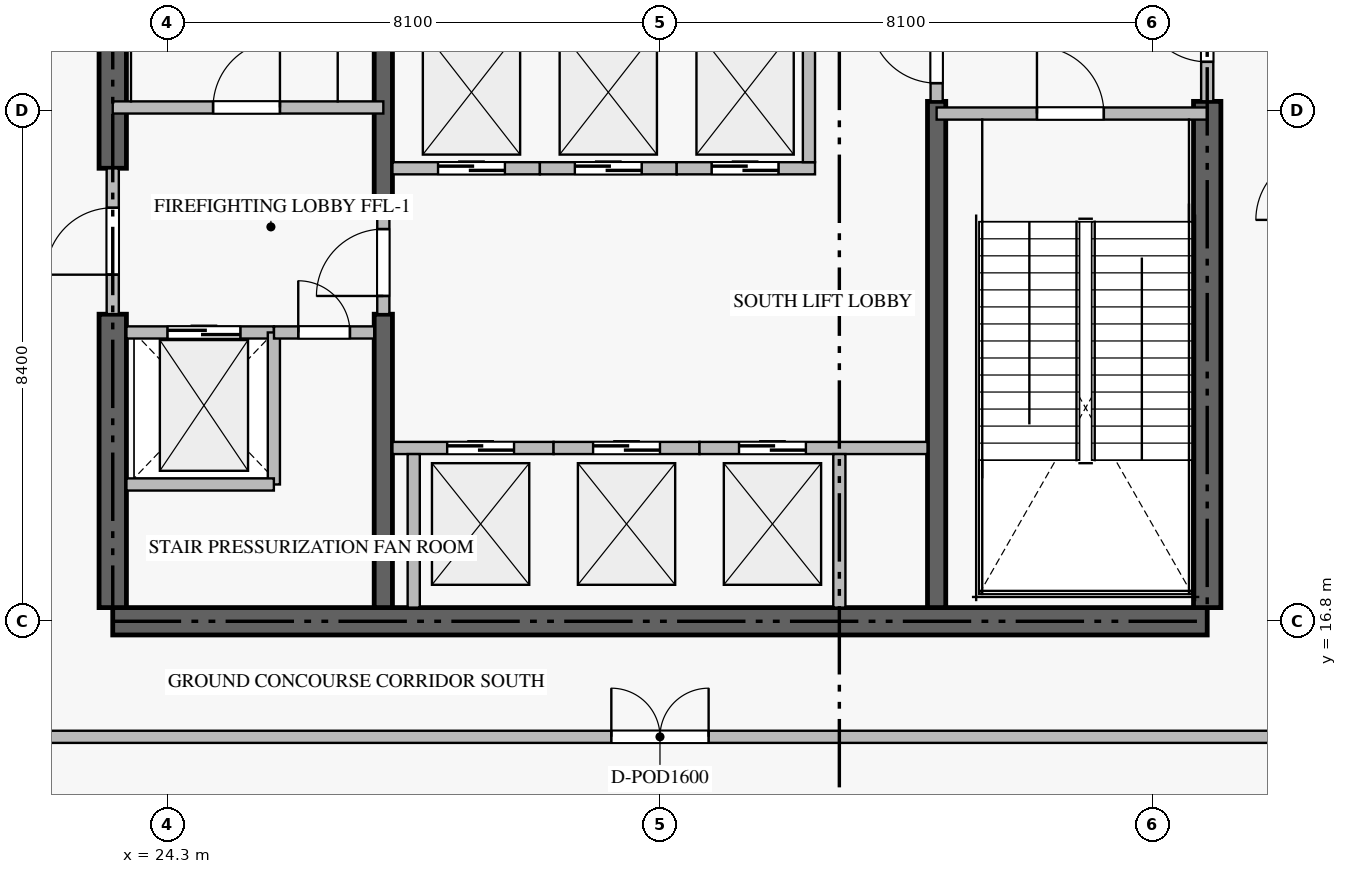
"""IFC4 building model, lengths in metres.
Left out: names, types, materials, properties, quantities, classifications, styles, units other than length and angle.
Written with IfcOpenShell. Run it as: python <this file> out.ifc"""

import sys

from ifc_helpers import new_model, si_unit, direction, frame, frame_2d, origin, place, context, subcontext, project, spatial, rectangle, extrude, source, transform, mapped, element, fill, save


model = new_model("IFC4")
c1 = context("Model", 3, precision=1e-05, world=origin(), true_north=direction((0.0, 1.0)))
c2 = subcontext(c1, "Body", "Model", "MODEL_VIEW")
j1 = project(units=[si_unit("LENGTHUNIT", "METRE"), si_unit("PLANEANGLEUNIT", "RADIAN")], contexts=[c1])
p1 = place(None, origin())
s1 = spatial("IfcSite", under=j1, at=p1, CompositionType="ELEMENT")
p2 = place(p1, origin())
s2 = spatial("IfcBuilding", under=s1, at=p2, CompositionType="ELEMENT")
p3 = place(p2, origin())
s3 = spatial("IfcBuildingStorey", under=s2, at=p3, CompositionType="ELEMENT", Elevation=0.0)
p4 = place(p3, frame((23.4, 16.8, -0.38), z_axis=(0.0, 0.0, 1.0), x_axis=(1.0, 0.0, 0.0)))
e1 = element("IfcWall", 1, at=p4, inside=s3, PredefinedType="SHEAR", context=c2, shape_type="SweptSolid", body=[
    extrude(rectangle(XDim=18.0, YDim=0.45, at=frame_2d((9.0, 0.0))), origin(), (0.0, 0.0, 1.0), 5.498),
])
p5 = place(p3, frame((23.4, 17.025, -0.38), z_axis=(0.0, 0.0, 1.0), x_axis=(0.0, 1.0, 0.0)))
e2 = element("IfcWall", 2, at=p5, inside=s3, PredefinedType="SHEAR", context=c2, shape_type="SweptSolid", body=[
    extrude(rectangle(XDim=4.825, YDim=0.45, at=frame_2d((2.413, 0.0))), origin(), (0.0, 0.0, 1.0), 5.498),
])
p6 = place(p3, frame((23.4, 24.25, -0.38), z_axis=(0.0, 0.0, 1.0), x_axis=(0.0, 1.0, 0.0)))
e3 = element("IfcWall", 3, at=p6, inside=s3, PredefinedType="SHEAR", context=c2, shape_type="SweptSolid", body=[
    extrude(rectangle(XDim=9.125, YDim=0.45, at=frame_2d((4.562, 0.0))), origin(), (0.0, 0.0, 1.0), 5.498),
])
p7 = place(p3, frame((41.4, 17.025, -0.38), z_axis=(0.0, 0.0, 1.0), x_axis=(0.0, 1.0, 0.0)))
e4 = element("IfcWall", 4, at=p7, inside=s3, PredefinedType="SHEAR", context=c2, shape_type="SweptSolid", body=[
    extrude(rectangle(XDim=8.325, YDim=0.45, at=frame_2d((4.163, 0.0))), origin(), (0.0, 0.0, 1.0), 5.498),
])
p8 = place(p3, frame((27.85, 17.025, -0.38), z_axis=(0.0, 0.0, 1.0), x_axis=(0.0, 1.0, 0.0)))
e5 = element("IfcWall", 5, at=p8, inside=s3, PredefinedType="SHEAR", context=c2, shape_type="SweptSolid", body=[
    extrude(rectangle(XDim=4.825, YDim=0.3, at=frame_2d((2.413, 0.0))), origin(), (0.0, 0.0, 1.0), 5.498),
])
p9 = place(p3, frame((27.85, 23.55, -0.38), z_axis=(0.0, 0.0, 1.0), x_axis=(0.0, 1.0, 0.0)))
e6 = element("IfcWall", 6, at=p9, inside=s3, PredefinedType="SHEAR", context=c2, shape_type="SweptSolid", body=[
    extrude(rectangle(XDim=9.825, YDim=0.3, at=frame_2d((4.913, 0.0))), origin(), (0.0, 0.0, 1.0), 5.498),
])
p10 = place(p3, frame((36.95, 17.025, -0.38), z_axis=(0.0, 0.0, 1.0), x_axis=(0.0, 1.0, 0.0)))
e7 = element("IfcWall", 7, at=p10, inside=s3, PredefinedType="SHEAR", context=c2, shape_type="SweptSolid", body=[
    extrude(rectangle(XDim=8.325, YDim=0.3, at=frame_2d((4.163, 0.0))), origin(), (0.0, 0.0, 1.0), 5.498),
])
p11 = place(p3, frame((23.4, 25.25, 0.0), z_axis=(0.0, 0.0, 1.0), x_axis=(1.0, 0.0, 0.0)))
e8 = element("IfcWall", 8, at=p11, inside=s3, PredefinedType="STANDARD", context=c2, shape_type="SweptSolid", body=[
    extrude(rectangle(XDim=4.45, YDim=0.2, at=frame_2d((2.225, 0.0))), origin(), (0.0, 0.0, 1.0), 5.12),
])
p12 = place(p11, frame((1.65, 0.0, 0.0)))
e9 = element("IfcOpeningElement", 9, at=p12, cuts=e8, PredefinedType="OPENING", context=c2, shape_type="SweptSolid", body=[
    extrude(rectangle(XDim=1.1, YDim=2.15, at=frame_2d((0.55, 1.075))), frame((0.0, 0.11, 0.0), z_axis=(0.0, -1.0, 0.0), x_axis=(1.0, 0.0, 0.0)), (0.0, 0.0, 1.0), 0.22),
])
p13 = place(p3, frame((36.95, 25.15, 0.0), z_axis=(0.0, 0.0, 1.0), x_axis=(1.0, 0.0, 0.0)))
e10 = element("IfcWall", 10, at=p13, inside=s3, PredefinedType="STANDARD", context=c2, shape_type="SweptSolid", body=[
    extrude(rectangle(XDim=4.45, YDim=0.2, at=frame_2d((2.225, 0.0))), origin(), (0.0, 0.0, 1.0), 5.12),
])
p14 = place(p13, frame((1.65, 0.0, 0.0)))
e11 = element("IfcOpeningElement", 11, at=p14, cuts=e10, PredefinedType="OPENING", context=c2, shape_type="SweptSolid", body=[
    extrude(rectangle(XDim=1.1, YDim=2.15, at=frame_2d((0.55, 1.075))), frame((0.0, 0.11, 0.0), z_axis=(0.0, -1.0, 0.0), x_axis=(1.0, 0.0, 0.0)), (0.0, 0.0, 1.0), 0.22),
])
p15 = place(p3, frame((23.625, 21.55, 0.0), z_axis=(0.0, 0.0, 1.0), x_axis=(1.0, 0.0, 0.0)))
e12 = element("IfcWall", 12, at=p15, inside=s3, PredefinedType="STANDARD", context=c2, shape_type="SweptSolid", body=[
    extrude(rectangle(XDim=2.425, YDim=0.2, at=frame_2d((1.212, 0.0))), origin(), (0.0, 0.0, 1.0), 5.12),
])
p16 = place(p15, frame((0.675, 0.0, 0.0)))
e13 = element("IfcOpeningElement", 13, at=p16, cuts=e12, PredefinedType="OPENING", context=c2, shape_type="SweptSolid", body=[
    extrude(rectangle(XDim=1.2, YDim=2.2, at=frame_2d((0.6, 1.1))), frame((0.0, 0.11, 0.0), z_axis=(0.0, -1.0, 0.0), x_axis=(1.0, 0.0, 0.0)), (0.0, 0.0, 1.0), 0.22),
])
p17 = place(p3, frame((28.0, 19.65, 0.0), z_axis=(0.0, 0.0, 1.0), x_axis=(1.0, 0.0, 0.0)))
e14 = element("IfcWall", 14, at=p17, inside=s3, PredefinedType="STANDARD", context=c2, shape_type="SweptSolid", body=[
    extrude(rectangle(XDim=2.65, YDim=0.2, at=frame_2d((1.325, 0.0))), origin(), (0.0, 0.0, 1.0), 5.12),
])
p18 = place(p17, frame((0.9, 0.0, 0.0)))
e15 = element("IfcOpeningElement", 15, at=p18, cuts=e14, PredefinedType="OPENING", context=c2, shape_type="SweptSolid", body=[
    extrude(rectangle(XDim=1.1, YDim=2.2, at=frame_2d((0.55, 1.1))), frame((0.0, 0.11, 0.0), z_axis=(0.0, -1.0, 0.0), x_axis=(1.0, 0.0, 0.0)), (0.0, 0.0, 1.0), 0.22),
])
p19 = place(p3, frame((28.35, 17.025, 0.0), z_axis=(0.0, 0.0, 1.0), x_axis=(0.0, 1.0, 0.0)))
e16 = element("IfcWall", 16, at=p19, inside=s3, PredefinedType="STANDARD", context=c2, shape_type="SweptSolid", body=[
    extrude(rectangle(XDim=2.525, YDim=0.2, at=frame_2d((1.263, 0.0))), origin(), (0.0, 0.0, 1.0), 5.12),
])
p20 = place(p3, frame((30.65, 19.65, 0.0), z_axis=(0.0, 0.0, 1.0), x_axis=(1.0, 0.0, 0.0)))
e17 = element("IfcWall", 17, at=p20, inside=s3, PredefinedType="STANDARD", context=c2, shape_type="SweptSolid", body=[
    extrude(rectangle(XDim=2.4, YDim=0.2, at=frame_2d((1.2, 0.0))), origin(), (0.0, 0.0, 1.0), 5.12),
])
p21 = place(p20, frame((0.65, 0.0, 0.0)))
e18 = element("IfcOpeningElement", 18, at=p21, cuts=e17, PredefinedType="OPENING", context=c2, shape_type="SweptSolid", body=[
    extrude(rectangle(XDim=1.1, YDim=2.2, at=frame_2d((0.55, 1.1))), frame((0.0, 0.11, 0.0), z_axis=(0.0, -1.0, 0.0), x_axis=(1.0, 0.0, 0.0)), (0.0, 0.0, 1.0), 0.22),
])
p22 = place(p3, frame((33.05, 19.65, 0.0), z_axis=(0.0, 0.0, 1.0), x_axis=(1.0, 0.0, 0.0)))
e19 = element("IfcWall", 19, at=p22, inside=s3, PredefinedType="STANDARD", context=c2, shape_type="SweptSolid", body=[
    extrude(rectangle(XDim=3.75, YDim=0.2, at=frame_2d((1.875, 0.0))), origin(), (0.0, 0.0, 1.0), 5.12),
])
p23 = place(p22, frame((0.65, 0.0, 0.0)))
e20 = element("IfcOpeningElement", 20, at=p23, cuts=e19, PredefinedType="OPENING", context=c2, shape_type="SweptSolid", body=[
    extrude(rectangle(XDim=1.1, YDim=2.2, at=frame_2d((0.55, 1.1))), frame((0.0, 0.11, 0.0), z_axis=(0.0, -1.0, 0.0), x_axis=(1.0, 0.0, 0.0)), (0.0, 0.0, 1.0), 0.22),
])
p24 = place(p3, frame((35.35, 17.025, 0.0), z_axis=(0.0, 0.0, 1.0), x_axis=(0.0, 1.0, 0.0)))
e21 = element("IfcWall", 21, at=p24, inside=s3, PredefinedType="STANDARD", context=c2, shape_type="SweptSolid", body=[
    extrude(rectangle(XDim=2.525, YDim=0.2, at=frame_2d((1.263, 0.0))), origin(), (0.0, 0.0, 1.0), 5.12),
])
p25 = place(p3, frame((28.0, 24.25, 0.0), z_axis=(0.0, 0.0, 1.0), x_axis=(1.0, 0.0, 0.0)))
e22 = element("IfcWall", 22, at=p25, inside=s3, PredefinedType="STANDARD", context=c2, shape_type="SweptSolid", body=[
    extrude(rectangle(XDim=2.425, YDim=0.2, at=frame_2d((1.212, 0.0))), origin(), (0.0, 0.0, 1.0), 5.12),
])
p26 = place(p25, frame((0.75, 0.0, 0.0)))
e23 = element("IfcOpeningElement", 23, at=p26, cuts=e22, PredefinedType="OPENING", context=c2, shape_type="SweptSolid", body=[
    extrude(rectangle(XDim=1.1, YDim=2.2, at=frame_2d((0.55, 1.1))), frame((0.0, 0.11, 0.0), z_axis=(0.0, -1.0, 0.0), x_axis=(1.0, 0.0, 0.0)), (0.0, 0.0, 1.0), 0.22),
])
p27 = place(p3, frame((30.425, 24.25, 0.0), z_axis=(0.0, 0.0, 1.0), x_axis=(1.0, 0.0, 0.0)))
e24 = element("IfcWall", 24, at=p27, inside=s3, PredefinedType="STANDARD", context=c2, shape_type="SweptSolid", body=[
    extrude(rectangle(XDim=2.25, YDim=0.2, at=frame_2d((1.125, 0.0))), origin(), (0.0, 0.0, 1.0), 5.12),
])
p28 = place(p27, frame((0.575, 0.0, 0.0)))
e25 = element("IfcOpeningElement", 25, at=p28, cuts=e24, PredefinedType="OPENING", context=c2, shape_type="SweptSolid", body=[
    extrude(rectangle(XDim=1.1, YDim=2.2, at=frame_2d((0.55, 1.1))), frame((0.0, 0.11, 0.0), z_axis=(0.0, -1.0, 0.0), x_axis=(1.0, 0.0, 0.0)), (0.0, 0.0, 1.0), 0.22),
])
p29 = place(p3, frame((32.675, 24.25, 0.0), z_axis=(0.0, 0.0, 1.0), x_axis=(1.0, 0.0, 0.0)))
e26 = element("IfcWall", 26, at=p29, inside=s3, PredefinedType="STANDARD", context=c2, shape_type="SweptSolid", body=[
    extrude(rectangle(XDim=2.275, YDim=0.2, at=frame_2d((1.137, 0.0))), origin(), (0.0, 0.0, 1.0), 5.12),
])
p30 = place(p29, frame((0.575, 0.0, 0.0)))
e27 = element("IfcOpeningElement", 27, at=p30, cuts=e26, PredefinedType="OPENING", context=c2, shape_type="SweptSolid", body=[
    extrude(rectangle(XDim=1.1, YDim=2.2, at=frame_2d((0.55, 1.1))), frame((0.0, 0.11, 0.0), z_axis=(0.0, -1.0, 0.0), x_axis=(1.0, 0.0, 0.0)), (0.0, 0.0, 1.0), 0.22),
])
for number, where, z_axis, x_axis in (
    (28, (34.85, 24.35, 0.0), (0.0, 0.0, 1.0), (0.0, 1.0, 0.0)),
    (29, (26.05, 19.05, 0.0), (0.0, 0.0, 1.0), (0.0, 1.0, 0.0)),
):
    element("IfcWall", number, at=place(p3, frame(where, z_axis=z_axis, x_axis=x_axis)), inside=s3, PredefinedType="STANDARD", context=c2, shape_type="SweptSolid", body=[
        extrude(rectangle(XDim=2.5, YDim=0.2, at=frame_2d((1.25, 0.0))), origin(), (0.0, 0.0, 1.0), 5.12),
    ])
p31 = place(p3, frame((23.625, 19.05, 0.0), z_axis=(0.0, 0.0, 1.0), x_axis=(1.0, 0.0, 0.0)))
e30 = element("IfcWall", 30, at=p31, inside=s3, PredefinedType="STANDARD", context=c2, shape_type="SweptSolid", body=[
    extrude(rectangle(XDim=2.425, YDim=0.2, at=frame_2d((1.212, 0.0))), origin(), (0.0, 0.0, 1.0), 5.12),
])
p32 = place(p3, frame((26.052, 21.55, 0.0), z_axis=(0.0, 0.0, 1.0), x_axis=(1.0, 0.0, 0.0)))
e31 = element("IfcWall", 31, at=p32, inside=s3, PredefinedType="STANDARD", context=c2, shape_type="SweptSolid", body=[
    extrude(rectangle(XDim=1.648, YDim=0.2, at=frame_2d((0.824, 0.0))), origin(), (0.0, 0.0, 1.0), 5.12),
])
p33 = place(p32, frame((0.399, 0.0, 0.0)))
e32 = element("IfcOpeningElement", 32, at=p33, cuts=e31, PredefinedType="OPENING", context=c2, shape_type="SweptSolid", body=[
    extrude(rectangle(XDim=0.85, YDim=2.1, at=frame_2d((0.425, 1.05))), frame((0.0, 0.11, 0.0), z_axis=(0.0, -1.0, 0.0), x_axis=(1.0, 0.0, 0.0)), (0.0, 0.0, 1.0), 0.22),
])
p34 = place(p3, frame((23.4, 21.852, 0.0), z_axis=(0.0, 0.0, 1.0), x_axis=(0.0, 1.0, 0.0)))
e33 = element("IfcWall", 33, at=p34, inside=s3, PredefinedType="STANDARD", context=c2, shape_type="SweptSolid", body=[
    extrude(rectangle(XDim=2.396, YDim=0.2, at=frame_2d((1.198, 0.0))), origin(), (0.0, 0.0, 1.0), 5.12),
])
p35 = place(p34, frame((0.648, 0.0, 0.0)))
e34 = element("IfcOpeningElement", 34, at=p35, cuts=e33, PredefinedType="OPENING", context=c2, shape_type="SweptSolid", body=[
    extrude(rectangle(XDim=1.1, YDim=2.15, at=frame_2d((0.55, 1.075))), frame((0.0, 0.11, 0.0), z_axis=(0.0, -1.0, 0.0), x_axis=(1.0, 0.0, 0.0)), (0.0, 0.0, 1.0), 0.22),
])
p36 = place(p3, frame((41.4, 25.352, 0.0), z_axis=(0.0, 0.0, 1.0), x_axis=(0.0, 1.0, 0.0)))
e35 = element("IfcWall", 35, at=p36, inside=s3, PredefinedType="STANDARD", context=c2, shape_type="SweptSolid", body=[
    extrude(rectangle(XDim=2.396, YDim=0.2, at=frame_2d((1.198, 0.0))), origin(), (0.0, 0.0, 1.0), 5.12),
])
p37 = place(p36, frame((0.648, 0.0, 0.0)))
e36 = element("IfcOpeningElement", 36, at=p37, cuts=e35, PredefinedType="OPENING", context=c2, shape_type="SweptSolid", body=[
    extrude(rectangle(XDim=1.1, YDim=2.15, at=frame_2d((0.55, 1.075))), frame((0.0, 0.11, 0.0), z_axis=(0.0, -1.0, 0.0), x_axis=(1.0, 0.0, 0.0)), (0.0, 0.0, 1.0), 0.22),
])
p38 = place(p3, frame((27.85, 21.852, 0.0), z_axis=(0.0, 0.0, 1.0), x_axis=(0.0, 1.0, 0.0)))
e37 = element("IfcWall", 37, at=p38, inside=s3, PredefinedType="STANDARD", context=c2, shape_type="SweptSolid", body=[
    extrude(rectangle(XDim=1.696, YDim=0.2, at=frame_2d((0.848, 0.0))), origin(), (0.0, 0.0, 1.0), 5.12),
])
p39 = place(p38, frame((0.298, 0.0, 0.0)))
e38 = element("IfcOpeningElement", 38, at=p39, cuts=e37, PredefinedType="OPENING", context=c2, shape_type="SweptSolid", body=[
    extrude(rectangle(XDim=1.1, YDim=2.15, at=frame_2d((0.55, 1.075))), frame((0.0, 0.11, 0.0), z_axis=(0.0, -1.0, 0.0), x_axis=(1.0, 0.0, 0.0)), (0.0, 0.0, 1.0), 0.22),
])
p40 = place(p3, frame((36.95, 25.352, 0.0), z_axis=(0.0, 0.0, 1.0), x_axis=(0.0, 1.0, 0.0)))
e39 = element("IfcWall", 39, at=p40, inside=s3, PredefinedType="STANDARD", context=c2, shape_type="SweptSolid", body=[
    extrude(rectangle(XDim=1.696, YDim=0.2, at=frame_2d((0.848, 0.0))), origin(), (0.0, 0.0, 1.0), 5.12),
])
p41 = place(p40, frame((0.298, 0.0, 0.0)))
e40 = element("IfcOpeningElement", 40, at=p41, cuts=e39, PredefinedType="OPENING", context=c2, shape_type="SweptSolid", body=[
    extrude(rectangle(XDim=1.1, YDim=2.15, at=frame_2d((0.55, 1.075))), frame((0.0, 0.11, 0.0), z_axis=(0.0, -1.0, 0.0), x_axis=(1.0, 0.0, 0.0)), (0.0, 0.0, 1.0), 0.22),
])
p42 = place(p3, frame((21.5, 14.9, 0.0), z_axis=(0.0, 0.0, 1.0), x_axis=(1.0, 0.0, 0.0)))
e41 = element("IfcWall", 41, at=p42, inside=s3, PredefinedType="STANDARD", context=c2, shape_type="SweptSolid", body=[
    extrude(rectangle(XDim=21.8, YDim=0.2, at=frame_2d((10.9, 0.0))), origin(), (0.0, 0.0, 1.0), 5.12),
])
p43 = place(p42, frame((10.1, 0.0, 0.0)))
e42 = element("IfcOpeningElement", 42, at=p43, cuts=e41, PredefinedType="OPENING", context=c2, shape_type="SweptSolid", body=[
    extrude(rectangle(XDim=1.6, YDim=2.3, at=frame_2d((0.8, 1.15))), frame((0.0, 0.11, 0.0), z_axis=(0.0, -1.0, 0.0), x_axis=(1.0, 0.0, 0.0)), (0.0, 0.0, 1.0), 0.22),
])
m1 = source(origin(), c2, "Body", "SweptSolid", [
    extrude(rectangle(XDim=1.1, YDim=2.15, at=frame_2d((0.55, 1.075))), frame((0.0, 0.025, 0.0), z_axis=(0.0, -1.0, 0.0), x_axis=(1.0, 0.0, 0.0)), (0.0, 0.0, 1.0), 0.05),
])
p44 = place(p12, origin())
e43 = element("IfcDoor", 43, at=p44, inside=s3, OperationType="SINGLE_SWING_RIGHT", PredefinedType="DOOR", context=c2, shape_type="MappedRepresentation", body=[
    mapped(m1, transform((0.0, 0.0, 0.0), scale=1.0)),
])
fill(e9, e43)
p45 = place(p14, origin())
e44 = element("IfcDoor", 44, at=p45, inside=s3, OperationType="SINGLE_SWING_LEFT", PredefinedType="DOOR", context=c2, shape_type="MappedRepresentation", body=[
    mapped(m1, transform((0.0, 0.0, 0.0), scale=1.0)),
])
fill(e11, e44)
m2 = source(origin(), c2, "Body", "SweptSolid", [
    extrude(rectangle(XDim=1.2, YDim=2.2, at=frame_2d((0.6, 1.1))), frame((0.0, 0.025, 0.0), z_axis=(0.0, -1.0, 0.0), x_axis=(1.0, 0.0, 0.0)), (0.0, 0.0, 1.0), 0.05),
])
p46 = place(p16, origin())
e45 = element("IfcDoor", 45, at=p46, inside=s3, OperationType="DOUBLE_DOOR_SLIDING", PredefinedType="DOOR", context=c2, shape_type="MappedRepresentation", body=[
    mapped(m2, transform((0.0, 0.0, 0.0), scale=1.0)),
])
fill(e13, e45)
m3 = source(origin(), c2, "Body", "SweptSolid", [
    extrude(rectangle(XDim=1.1, YDim=2.2, at=frame_2d((0.55, 1.1))), frame((0.0, 0.025, 0.0), z_axis=(0.0, -1.0, 0.0), x_axis=(1.0, 0.0, 0.0)), (0.0, 0.0, 1.0), 0.05),
])
p47 = place(p18, origin())
e46 = element("IfcDoor", 46, at=p47, inside=s3, OperationType="DOUBLE_DOOR_SLIDING", PredefinedType="DOOR", context=c2, shape_type="MappedRepresentation", body=[
    mapped(m3, transform((0.0, 0.0, 0.0), scale=1.0)),
])
fill(e15, e46)
p48 = place(p21, origin())
e47 = element("IfcDoor", 47, at=p48, inside=s3, OperationType="DOUBLE_DOOR_SLIDING", PredefinedType="DOOR", context=c2, shape_type="MappedRepresentation", body=[
    mapped(m3, transform((0.0, 0.0, 0.0), scale=1.0)),
])
fill(e18, e47)
p49 = place(p23, origin())
e48 = element("IfcDoor", 48, at=p49, inside=s3, OperationType="DOUBLE_DOOR_SLIDING", PredefinedType="DOOR", context=c2, shape_type="MappedRepresentation", body=[
    mapped(m3, transform((0.0, 0.0, 0.0), scale=1.0)),
])
fill(e20, e48)
p50 = place(p26, origin())
e49 = element("IfcDoor", 49, at=p50, inside=s3, OperationType="DOUBLE_DOOR_SLIDING", PredefinedType="DOOR", context=c2, shape_type="MappedRepresentation", body=[
    mapped(m3, transform((0.0, 0.0, 0.0), scale=1.0)),
])
fill(e23, e49)
p51 = place(p28, origin())
e50 = element("IfcDoor", 50, at=p51, inside=s3, OperationType="DOUBLE_DOOR_SLIDING", PredefinedType="DOOR", context=c2, shape_type="MappedRepresentation", body=[
    mapped(m3, transform((0.0, 0.0, 0.0), scale=1.0)),
])
fill(e25, e50)
p52 = place(p30, origin())
e51 = element("IfcDoor", 51, at=p52, inside=s3, OperationType="DOUBLE_DOOR_SLIDING", PredefinedType="DOOR", context=c2, shape_type="MappedRepresentation", body=[
    mapped(m3, transform((0.0, 0.0, 0.0), scale=1.0)),
])
fill(e27, e51)
m4 = source(origin(), c2, "Body", "SweptSolid", [
    extrude(rectangle(XDim=0.85, YDim=2.1, at=frame_2d((0.425, 1.05))), frame((0.0, 0.025, 0.0), z_axis=(0.0, -1.0, 0.0), x_axis=(1.0, 0.0, 0.0)), (0.0, 0.0, 1.0), 0.05),
])
p53 = place(p33, origin())
e52 = element("IfcDoor", 52, at=p53, inside=s3, OperationType="SINGLE_SWING_LEFT", PredefinedType="DOOR", context=c2, shape_type="MappedRepresentation", body=[
    mapped(m4, transform((0.0, 0.0, 0.0), scale=1.0)),
])
fill(e32, e52)
p54 = place(p35, origin())
e53 = element("IfcDoor", 53, at=p54, inside=s3, OperationType="SINGLE_SWING_LEFT", PredefinedType="DOOR", context=c2, shape_type="MappedRepresentation", body=[
    mapped(m1, transform((0.0, 0.0, 0.0), scale=1.0)),
])
fill(e34, e53)
p55 = place(p37, origin())
e54 = element("IfcDoor", 54, at=p55, inside=s3, OperationType="SINGLE_SWING_RIGHT", PredefinedType="DOOR", context=c2, shape_type="MappedRepresentation", body=[
    mapped(m1, transform((0.0, 0.0, 0.0), scale=1.0)),
])
fill(e36, e54)
p56 = place(p39, origin())
e55 = element("IfcDoor", 55, at=p56, inside=s3, OperationType="SINGLE_SWING_LEFT", PredefinedType="DOOR", context=c2, shape_type="MappedRepresentation", body=[
    mapped(m1, transform((0.0, 0.0, 0.0), scale=1.0)),
])
fill(e38, e55)
p57 = place(p41, origin())
e56 = element("IfcDoor", 56, at=p57, inside=s3, OperationType="SINGLE_SWING_RIGHT", PredefinedType="DOOR", context=c2, shape_type="MappedRepresentation", body=[
    mapped(m1, transform((0.0, 0.0, 0.0), scale=1.0)),
])
fill(e40, e56)
m5 = source(origin(), c2, "Body", "SweptSolid", [
    extrude(rectangle(XDim=1.6, YDim=2.3, at=frame_2d((0.8, 1.15))), frame((0.0, 0.025, 0.0), z_axis=(0.0, -1.0, 0.0), x_axis=(1.0, 0.0, 0.0)), (0.0, 0.0, 1.0), 0.05),
])
p58 = place(p43, origin())
e57 = element("IfcDoor", 57, at=p58, inside=s3, OperationType="DOUBLE_DOOR_SINGLE_SWING", PredefinedType="DOOR", context=c2, shape_type="MappedRepresentation", body=[
    mapped(m5, transform((0.0, 0.0, 0.0), scale=1.0)),
])
fill(e42, e57)
save(model, sys.argv[1])
